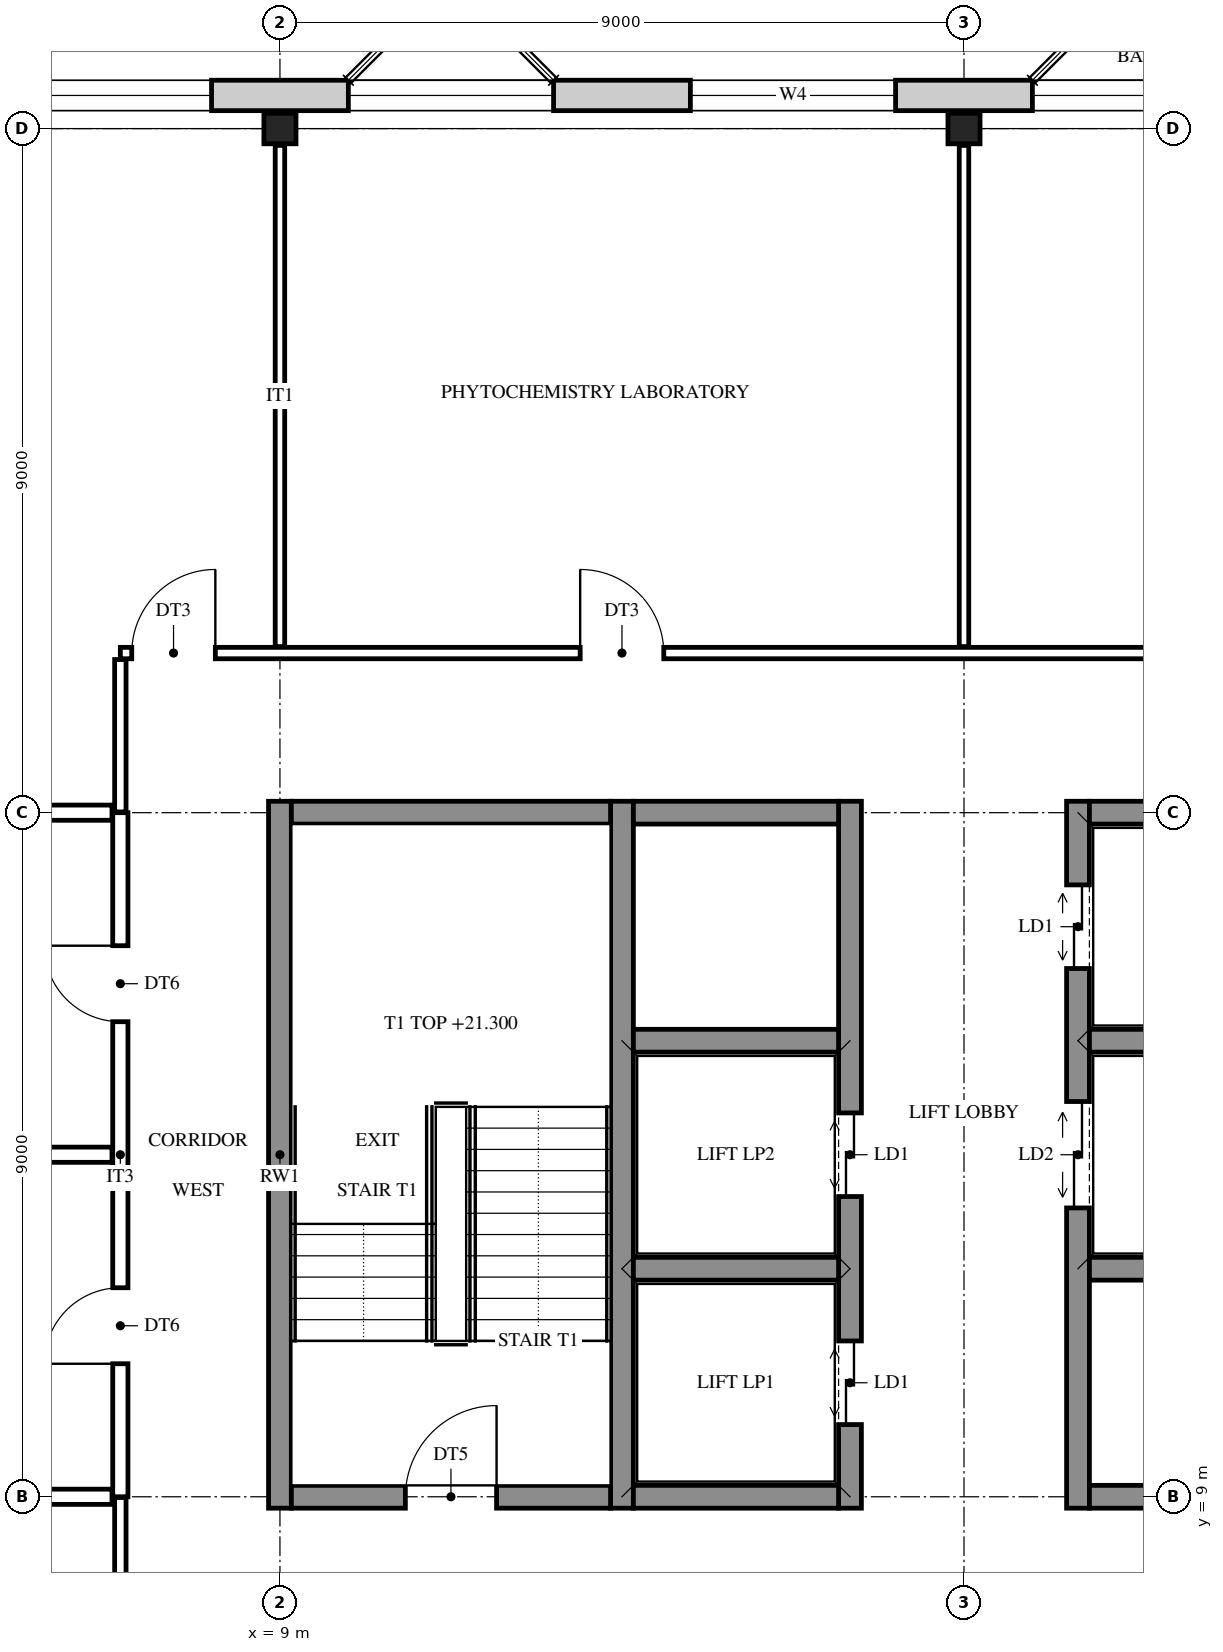
"""IFC4 building model, lengths in metres.
Left out: names, types, materials, properties, quantities, classifications, styles, units other than length and angle.
Written with IfcOpenShell. Run it as: python <this file> out.ifc"""

import sys

from ifc_helpers import new_model, si_unit, direction, frame, frame_2d, origin, origin_2d, place, context, subcontext, project, spatial, rectangle, i_section, extrude, element, fill, save


model = new_model("IFC4")
c1 = context("Model", 3, precision=1e-05, world=origin(), true_north=direction((0.0, 1.0)))
c2 = subcontext(c1, "Body", "Model", "MODEL_VIEW")
j1 = project(units=[si_unit("LENGTHUNIT", "METRE"), si_unit("PLANEANGLEUNIT", "RADIAN")], contexts=[c1])
p1 = place(None, origin())
s1 = spatial("IfcSite", under=j1, at=p1, CompositionType="ELEMENT")
p2 = place(p1, origin())
s2 = spatial("IfcBuilding", under=s1, at=p2, CompositionType="ELEMENT")
p3 = place(p2, frame((0.0, 0.0, 19.2)))
s3 = spatial("IfcBuildingStorey", under=s2, at=p3, CompositionType="ELEMENT", Elevation=19.2)
for number, where, z_axis, x_axis in (
    (1, (9.0, 27.0, 0.0), (0.0, 0.0, 1.0), (0.0, 1.0, 0.0)),
    (2, (18.0, 27.0, 0.0), (0.0, 0.0, 1.0), (0.0, 1.0, 0.0)),
):
    element("IfcColumn", number, at=place(p3, frame(where, z_axis=z_axis, x_axis=x_axis)), inside=s3, PredefinedType="COLUMN", context=c2, shape_type="SweptSolid", body=[
        extrude(i_section(OverallWidth=0.4, OverallDepth=0.422, WebThickness=0.028, FlangeThickness=0.036, at=origin_2d()), origin(), (0.0, 0.0, 1.0), 4.2),
    ])
for number, where, z_axis, x_axis in (
    (3, (9.0, 8.85, 0.0), (0.0, 0.0, 1.0), (0.0, 1.0, 0.0)),
    (4, (13.5, 8.85, 0.0), (0.0, 0.0, 1.0), (0.0, 1.0, 0.0)),
):
    element("IfcWall", number, at=place(p3, frame(where, z_axis=z_axis, x_axis=x_axis)), inside=s3, PredefinedType="SHEAR", context=c2, shape_type="SweptSolid", body=[
        extrude(rectangle(XDim=9.3, YDim=0.3, at=frame_2d((4.65, 0.0))), origin(), (0.0, 0.0, 1.0), 4.2),
    ])
p4 = place(p3, frame((16.5, 8.85, 0.0), z_axis=(0.0, 0.0, 1.0), x_axis=(0.0, 1.0, 0.0)))
e5 = element("IfcWall", 5, at=p4, inside=s3, PredefinedType="SHEAR", context=c2, shape_type="SweptSolid", body=[
    extrude(rectangle(XDim=9.3, YDim=0.3, at=frame_2d((4.65, 0.0))), origin(), (0.0, 0.0, 1.0), 4.2),
])
p5 = place(p4, frame((1.1, 0.0, 0.0)))
e6 = element("IfcOpeningElement", 6, at=p5, cuts=e5, PredefinedType="OPENING", context=c2, shape_type="SweptSolid", body=[
    extrude(rectangle(XDim=1.1, YDim=2.1, at=frame_2d((0.55, 1.05))), frame((0.0, 0.16, 0.0), z_axis=(0.0, -1.0, 0.0), x_axis=(1.0, 0.0, 0.0)), (0.0, 0.0, 1.0), 0.32),
])
p6 = place(p4, frame((4.1, 0.0, 0.0)))
e7 = element("IfcOpeningElement", 7, at=p6, cuts=e5, PredefinedType="OPENING", context=c2, shape_type="SweptSolid", body=[
    extrude(rectangle(XDim=1.1, YDim=2.1, at=frame_2d((0.55, 1.05))), frame((0.0, 0.16, 0.0), z_axis=(0.0, -1.0, 0.0), x_axis=(1.0, 0.0, 0.0)), (0.0, 0.0, 1.0), 0.32),
])
p7 = place(p3, frame((19.5, 8.85, 0.0), z_axis=(0.0, 0.0, 1.0), x_axis=(0.0, 1.0, 0.0)))
e8 = element("IfcWall", 8, at=p7, inside=s3, PredefinedType="SHEAR", context=c2, shape_type="SweptSolid", body=[
    extrude(rectangle(XDim=9.3, YDim=0.3, at=frame_2d((4.65, 0.0))), origin(), (0.0, 0.0, 1.0), 4.2),
])
p8 = place(p7, frame((3.95, 0.0, 0.0)))
e9 = element("IfcOpeningElement", 9, at=p8, cuts=e8, PredefinedType="OPENING", context=c2, shape_type="SweptSolid", body=[
    extrude(rectangle(XDim=1.4, YDim=2.1, at=frame_2d((0.7, 1.05))), frame((0.0, 0.16, 0.0), z_axis=(0.0, -1.0, 0.0), x_axis=(1.0, 0.0, 0.0)), (0.0, 0.0, 1.0), 0.32),
])
p9 = place(p7, frame((7.1, 0.0, 0.0)))
e10 = element("IfcOpeningElement", 10, at=p9, cuts=e8, PredefinedType="OPENING", context=c2, shape_type="SweptSolid", body=[
    extrude(rectangle(XDim=1.1, YDim=2.1, at=frame_2d((0.55, 1.05))), frame((0.0, 0.16, 0.0), z_axis=(0.0, -1.0, 0.0), x_axis=(1.0, 0.0, 0.0)), (0.0, 0.0, 1.0), 0.32),
])
p10 = place(p3, frame((9.15, 9.0, 0.0), z_axis=(0.0, 0.0, 1.0), x_axis=(1.0, 0.0, 0.0)))
e11 = element("IfcWall", 11, at=p10, inside=s3, PredefinedType="SHEAR", context=c2, shape_type="SweptSolid", body=[
    extrude(rectangle(XDim=4.2, YDim=0.3, at=frame_2d((2.1, 0.0))), origin(), (0.0, 0.0, 1.0), 4.2),
])
p11 = place(p10, frame((1.5, 0.0, 0.0)))
e12 = element("IfcOpeningElement", 12, at=p11, cuts=e11, PredefinedType="OPENING", context=c2, shape_type="SweptSolid", body=[
    extrude(rectangle(XDim=1.2, YDim=2.1, at=frame_2d((0.6, 1.05))), frame((0.0, 0.16, 0.0), z_axis=(0.0, -1.0, 0.0), x_axis=(1.0, 0.0, 0.0)), (0.0, 0.0, 1.0), 0.32),
])
for number, where, z_axis, x_axis in (
    (13, (13.65, 9.0, 0.0), (0.0, 0.0, 1.0), (1.0, 0.0, 0.0)),
    (14, (19.65, 9.0, 0.0), (0.0, 0.0, 1.0), (1.0, 0.0, 0.0)),
    (15, (13.65, 12.0, 0.0), (0.0, 0.0, 1.0), (1.0, 0.0, 0.0)),
    (16, (19.65, 12.0, 0.0), (0.0, 0.0, 1.0), (1.0, 0.0, 0.0)),
    (17, (13.65, 15.0, 0.0), (0.0, 0.0, 1.0), (1.0, 0.0, 0.0)),
    (18, (19.65, 15.0, 0.0), (0.0, 0.0, 1.0), (1.0, 0.0, 0.0)),
):
    element("IfcWall", number, at=place(p3, frame(where, z_axis=z_axis, x_axis=x_axis)), inside=s3, PredefinedType="SHEAR", context=c2, shape_type="SweptSolid", body=[
        extrude(rectangle(XDim=2.7, YDim=0.3, at=frame_2d((1.35, 0.0))), origin(), (0.0, 0.0, 1.0), 4.2),
    ])
p12 = place(p3, frame((9.15, 18.0, 0.0), z_axis=(0.0, 0.0, 1.0), x_axis=(1.0, 0.0, 0.0)))
e19 = element("IfcWall", 19, at=p12, inside=s3, PredefinedType="SHEAR", context=c2, shape_type="SweptSolid", body=[
    extrude(rectangle(XDim=4.2, YDim=0.3, at=frame_2d((2.1, 0.0))), origin(), (0.0, 0.0, 1.0), 4.2),
])
for number, where, z_axis, x_axis in (
    (20, (13.65, 18.0, 0.0), (0.0, 0.0, 1.0), (1.0, 0.0, 0.0)),
    (21, (19.65, 18.0, 0.0), (0.0, 0.0, 1.0), (1.0, 0.0, 0.0)),
):
    element("IfcWall", number, at=place(p3, frame(where, z_axis=z_axis, x_axis=x_axis)), inside=s3, PredefinedType="SHEAR", context=c2, shape_type="SweptSolid", body=[
        extrude(rectangle(XDim=2.7, YDim=0.3, at=frame_2d((1.35, 0.0))), origin(), (0.0, 0.0, 1.0), 4.2),
    ])
p13 = place(p3, frame((-0.625, 27.436, 0.0), z_axis=(0.0, 0.0, 1.0), x_axis=(1.0, 0.0, 0.0)))
e22 = element("IfcWall", 22, at=p13, inside=s3, PredefinedType="STANDARD", context=c2, shape_type="SweptSolid", body=[
    extrude(rectangle(XDim=32.75, YDim=0.4, at=frame_2d((16.375, 0.0))), origin(), (0.0, 0.0, 1.0), 4.2),
])
p14 = place(p13, frame((1.525, 0.0, 0.9)))
e23 = element("IfcOpeningElement", 23, at=p14, cuts=e22, PredefinedType="OPENING", context=c2, shape_type="SweptSolid", body=[
    extrude(rectangle(XDim=2.7, YDim=2.5, at=frame_2d((1.35, 1.25))), frame((0.0, 0.21, 0.0), z_axis=(0.0, -1.0, 0.0), x_axis=(1.0, 0.0, 0.0)), (0.0, 0.0, 1.0), 0.42),
])
p15 = place(p13, frame((6.025, 0.0, 0.9)))
e24 = element("IfcOpeningElement", 24, at=p15, cuts=e22, PredefinedType="OPENING", context=c2, shape_type="SweptSolid", body=[
    extrude(rectangle(XDim=2.7, YDim=2.5, at=frame_2d((1.35, 1.25))), frame((0.0, 0.21, 0.0), z_axis=(0.0, -1.0, 0.0), x_axis=(1.0, 0.0, 0.0)), (0.0, 0.0, 1.0), 0.42),
])
p16 = place(p13, frame((10.525, 0.0, 0.9)))
e25 = element("IfcOpeningElement", 25, at=p16, cuts=e22, PredefinedType="OPENING", context=c2, shape_type="SweptSolid", body=[
    extrude(rectangle(XDim=2.7, YDim=2.5, at=frame_2d((1.35, 1.25))), frame((0.0, 0.21, 0.0), z_axis=(0.0, -1.0, 0.0), x_axis=(1.0, 0.0, 0.0)), (0.0, 0.0, 1.0), 0.42),
])
p17 = place(p13, frame((15.025, 0.0, 0.9)))
e26 = element("IfcOpeningElement", 26, at=p17, cuts=e22, PredefinedType="OPENING", context=c2, shape_type="SweptSolid", body=[
    extrude(rectangle(XDim=2.7, YDim=2.5, at=frame_2d((1.35, 1.25))), frame((0.0, 0.21, 0.0), z_axis=(0.0, -1.0, 0.0), x_axis=(1.0, 0.0, 0.0)), (0.0, 0.0, 1.0), 0.42),
])
p18 = place(p13, frame((19.525, 0.0, 0.9)))
e27 = element("IfcOpeningElement", 27, at=p18, cuts=e22, PredefinedType="OPENING", context=c2, shape_type="SweptSolid", body=[
    extrude(rectangle(XDim=2.7, YDim=2.5, at=frame_2d((1.35, 1.25))), frame((0.0, 0.21, 0.0), z_axis=(0.0, -1.0, 0.0), x_axis=(1.0, 0.0, 0.0)), (0.0, 0.0, 1.0), 0.42),
])
p19 = place(p13, frame((24.025, 0.0, 0.9)))
e28 = element("IfcOpeningElement", 28, at=p19, cuts=e22, PredefinedType="OPENING", context=c2, shape_type="SweptSolid", body=[
    extrude(rectangle(XDim=2.7, YDim=2.5, at=frame_2d((1.35, 1.25))), frame((0.0, 0.21, 0.0), z_axis=(0.0, -1.0, 0.0), x_axis=(1.0, 0.0, 0.0)), (0.0, 0.0, 1.0), 0.42),
])
p20 = place(p13, frame((28.525, 0.0, 0.9)))
e29 = element("IfcOpeningElement", 29, at=p20, cuts=e22, PredefinedType="OPENING", context=c2, shape_type="SweptSolid", body=[
    extrude(rectangle(XDim=2.7, YDim=2.5, at=frame_2d((1.35, 1.25))), frame((0.0, 0.21, 0.0), z_axis=(0.0, -1.0, 0.0), x_axis=(1.0, 0.0, 0.0)), (0.0, 0.0, 1.0), 0.42),
])
p21 = place(p3, frame((6.9, 6.985, 0.0), z_axis=(0.0, 0.0, 1.0), x_axis=(0.0, 1.0, 0.0)))
e30 = element("IfcWall", 30, at=p21, inside=s3, PredefinedType="PARTITIONING", context=c2, shape_type="SweptSolid", body=[
    extrude(rectangle(XDim=2.005, YDim=0.15, at=frame_2d((1.002, 0.0))), origin(), (0.0, 0.0, 1.0), 3.537),
])
p22 = place(p3, frame((6.9, 9.0, 0.0), z_axis=(0.0, 0.0, 1.0), x_axis=(0.0, 1.0, 0.0)))
e31 = element("IfcWall", 31, at=p22, inside=s3, PredefinedType="PARTITIONING", context=c2, shape_type="SweptSolid", body=[
    extrude(rectangle(XDim=9.0, YDim=0.2, at=frame_2d((4.5, 0.0))), origin(), (0.0, 0.0, 1.0), 3.537),
])
p23 = place(p22, frame((1.75, 0.0, 0.0)))
e32 = element("IfcOpeningElement", 32, at=p23, cuts=e31, PredefinedType="OPENING", context=c2, shape_type="SweptSolid", body=[
    extrude(rectangle(XDim=1.0, YDim=2.1, at=frame_2d((0.5, 1.05))), frame((0.0, 0.11, 0.0), z_axis=(0.0, -1.0, 0.0), x_axis=(1.0, 0.0, 0.0)), (0.0, 0.0, 1.0), 0.22),
])
p24 = place(p22, frame((6.25, 0.0, 0.0)))
e33 = element("IfcOpeningElement", 33, at=p24, cuts=e31, PredefinedType="OPENING", context=c2, shape_type="SweptSolid", body=[
    extrude(rectangle(XDim=1.0, YDim=2.1, at=frame_2d((0.5, 1.05))), frame((0.0, 0.11, 0.0), z_axis=(0.0, -1.0, 0.0), x_axis=(1.0, 0.0, 0.0)), (0.0, 0.0, 1.0), 0.22),
])
p25 = place(p3, frame((6.9, 18.01, 0.0), z_axis=(0.0, 0.0, 1.0), x_axis=(0.0, 1.0, 0.0)))
e34 = element("IfcWall", 34, at=p25, inside=s3, PredefinedType="PARTITIONING", context=c2, shape_type="SweptSolid", body=[
    extrude(rectangle(XDim=2.005, YDim=0.15, at=frame_2d((1.002, 0.0))), origin(), (0.0, 0.0, 1.0), 3.537),
])
for number, where, z_axis, x_axis in (
    (35, (9.0, 20.185, 0.0), (0.0, 0.0, 1.0), (0.0, 1.0, 0.0)),
    (36, (18.0, 20.185, 0.0), (0.0, 0.0, 1.0), (0.0, 1.0, 0.0)),
):
    element("IfcWall", number, at=place(p3, frame(where, z_axis=z_axis, x_axis=x_axis)), inside=s3, PredefinedType="PARTITIONING", context=c2, shape_type="SweptSolid", body=[
        extrude(rectangle(XDim=6.594, YDim=0.125, at=frame_2d((3.297, 0.0))), origin(), (0.0, 0.0, 1.0), 3.537),
    ])
p26 = place(p3, frame((0.21, 9.0, 0.0), z_axis=(0.0, 0.0, 1.0), x_axis=(1.0, 0.0, 0.0)))
e37 = element("IfcWall", 37, at=p26, inside=s3, PredefinedType="PARTITIONING", context=c2, shape_type="SweptSolid", body=[
    extrude(rectangle(XDim=6.58, YDim=0.2, at=frame_2d((3.29, 0.0))), origin(), (0.0, 0.0, 1.0), 3.537),
])
p27 = place(p3, frame((-0.215, 13.5, 0.0), z_axis=(0.0, 0.0, 1.0), x_axis=(1.0, 0.0, 0.0)))
e38 = element("IfcWall", 38, at=p27, inside=s3, PredefinedType="PARTITIONING", context=c2, shape_type="SweptSolid", body=[
    extrude(rectangle(XDim=7.005, YDim=0.2, at=frame_2d((3.502, 0.0))), origin(), (0.0, 0.0, 1.0), 3.537),
])
p28 = place(p3, frame((0.21, 18.0, 0.0), z_axis=(0.0, 0.0, 1.0), x_axis=(1.0, 0.0, 0.0)))
e39 = element("IfcWall", 39, at=p28, inside=s3, PredefinedType="PARTITIONING", context=c2, shape_type="SweptSolid", body=[
    extrude(rectangle(XDim=6.58, YDim=0.2, at=frame_2d((3.29, 0.0))), origin(), (0.0, 0.0, 1.0), 3.537),
])
p29 = place(p3, frame((6.9, 20.1, 0.0), z_axis=(0.0, 0.0, 1.0), x_axis=(1.0, 0.0, 0.0)))
e40 = element("IfcWall", 40, at=p29, inside=s3, PredefinedType="PARTITIONING", context=c2, shape_type="SweptSolid", body=[
    extrude(rectangle(XDim=20.1, YDim=0.15, at=frame_2d((10.05, 0.0))), origin(), (0.0, 0.0, 1.0), 3.537),
])
p30 = place(p29, frame((0.15, 0.0, 0.0)))
e41 = element("IfcOpeningElement", 41, at=p30, cuts=e40, PredefinedType="OPENING", context=c2, shape_type="SweptSolid", body=[
    extrude(rectangle(XDim=1.1, YDim=2.1, at=frame_2d((0.55, 1.05))), frame((0.0, 0.085, 0.0), z_axis=(0.0, -1.0, 0.0), x_axis=(1.0, 0.0, 0.0)), (0.0, 0.0, 1.0), 0.17),
])
p31 = place(p29, frame((6.05, 0.0, 0.0)))
e42 = element("IfcOpeningElement", 42, at=p31, cuts=e40, PredefinedType="OPENING", context=c2, shape_type="SweptSolid", body=[
    extrude(rectangle(XDim=1.1, YDim=2.1, at=frame_2d((0.55, 1.05))), frame((0.0, 0.085, 0.0), z_axis=(0.0, -1.0, 0.0), x_axis=(1.0, 0.0, 0.0)), (0.0, 0.0, 1.0), 0.17),
])
p32 = place(p29, frame((16.25, 0.0, 0.0)))
e43 = element("IfcOpeningElement", 43, at=p32, cuts=e40, PredefinedType="OPENING", context=c2, shape_type="SweptSolid", body=[
    extrude(rectangle(XDim=1.1, YDim=2.1, at=frame_2d((0.55, 1.05))), frame((0.0, 0.085, 0.0), z_axis=(0.0, -1.0, 0.0), x_axis=(1.0, 0.0, 0.0)), (0.0, 0.0, 1.0), 0.17),
])
p33 = place(p15, origin())
e44 = element("IfcWindow", 44, at=p33, inside=s3, PartitioningType="SINGLE_PANEL", PredefinedType="WINDOW", context=c2, shape_type="SweptSolid", body=[
    extrude(rectangle(XDim=2.7, YDim=2.5, at=frame_2d((1.35, 1.25))), frame((0.0, 0.03, 0.0), z_axis=(0.0, -1.0, 0.0), x_axis=(1.0, 0.0, 0.0)), (0.0, 0.0, 1.0), 0.06),
])
fill(e24, e44)
p34 = place(p16, origin())
e45 = element("IfcWindow", 45, at=p34, inside=s3, PartitioningType="SINGLE_PANEL", PredefinedType="WINDOW", context=c2, shape_type="SweptSolid", body=[
    extrude(rectangle(XDim=2.7, YDim=2.5, at=frame_2d((1.35, 1.25))), frame((0.0, 0.03, 0.0), z_axis=(0.0, -1.0, 0.0), x_axis=(1.0, 0.0, 0.0)), (0.0, 0.0, 1.0), 0.06),
])
fill(e25, e45)
p35 = place(p17, origin())
e46 = element("IfcWindow", 46, at=p35, inside=s3, PartitioningType="SINGLE_PANEL", PredefinedType="WINDOW", context=c2, shape_type="SweptSolid", body=[
    extrude(rectangle(XDim=2.7, YDim=2.5, at=frame_2d((1.35, 1.25))), frame((0.0, 0.03, 0.0), z_axis=(0.0, -1.0, 0.0), x_axis=(1.0, 0.0, 0.0)), (0.0, 0.0, 1.0), 0.06),
])
fill(e26, e46)
p36 = place(p18, origin())
e47 = element("IfcWindow", 47, at=p36, inside=s3, PartitioningType="SINGLE_PANEL", PredefinedType="WINDOW", context=c2, shape_type="SweptSolid", body=[
    extrude(rectangle(XDim=2.7, YDim=2.5, at=frame_2d((1.35, 1.25))), frame((0.0, 0.03, 0.0), z_axis=(0.0, -1.0, 0.0), x_axis=(1.0, 0.0, 0.0)), (0.0, 0.0, 1.0), 0.06),
])
fill(e27, e47)
p37 = place(p11, origin())
e48 = element("IfcDoor", 48, at=p37, inside=s3, OperationType="SINGLE_SWING_RIGHT", PredefinedType="DOOR", context=c2, shape_type="SweptSolid", body=[
    extrude(rectangle(XDim=1.2, YDim=2.1, at=frame_2d((0.6, 1.05))), frame((0.0, 0.025, 0.0), z_axis=(0.0, -1.0, 0.0), x_axis=(1.0, 0.0, 0.0)), (0.0, 0.0, 1.0), 0.05),
])
fill(e12, e48)
p38 = place(p30, origin())
e49 = element("IfcDoor", 49, at=p38, inside=s3, OperationType="SINGLE_SWING_RIGHT", PredefinedType="DOOR", context=c2, shape_type="SweptSolid", body=[
    extrude(rectangle(XDim=1.1, YDim=2.1, at=frame_2d((0.55, 1.05))), frame((0.0, 0.025, 0.0), z_axis=(0.0, -1.0, 0.0), x_axis=(1.0, 0.0, 0.0)), (0.0, 0.0, 1.0), 0.05),
])
fill(e41, e49)
p39 = place(p31, origin())
e50 = element("IfcDoor", 50, at=p39, inside=s3, OperationType="SINGLE_SWING_LEFT", PredefinedType="DOOR", context=c2, shape_type="SweptSolid", body=[
    extrude(rectangle(XDim=1.1, YDim=2.1, at=frame_2d((0.55, 1.05))), frame((0.0, 0.025, 0.0), z_axis=(0.0, -1.0, 0.0), x_axis=(1.0, 0.0, 0.0)), (0.0, 0.0, 1.0), 0.05),
])
fill(e42, e50)
p40 = place(p23, origin())
e51 = element("IfcDoor", 51, at=p40, inside=s3, OperationType="SINGLE_SWING_LEFT", PredefinedType="DOOR", context=c2, shape_type="SweptSolid", body=[
    extrude(rectangle(XDim=1.0, YDim=2.1, at=frame_2d((0.5, 1.05))), frame((0.0, 0.025, 0.0), z_axis=(0.0, -1.0, 0.0), x_axis=(1.0, 0.0, 0.0)), (0.0, 0.0, 1.0), 0.05),
])
fill(e32, e51)
p41 = place(p24, origin())
e52 = element("IfcDoor", 52, at=p41, inside=s3, OperationType="SINGLE_SWING_RIGHT", PredefinedType="DOOR", context=c2, shape_type="SweptSolid", body=[
    extrude(rectangle(XDim=1.0, YDim=2.1, at=frame_2d((0.5, 1.05))), frame((0.0, 0.025, 0.0), z_axis=(0.0, -1.0, 0.0), x_axis=(1.0, 0.0, 0.0)), (0.0, 0.0, 1.0), 0.05),
])
fill(e33, e52)
p42 = place(p5, origin())
e53 = element("IfcDoor", 53, at=p42, inside=s3, OperationType="DOUBLE_DOOR_SLIDING", PredefinedType="DOOR", context=c2, shape_type="SweptSolid", body=[
    extrude(rectangle(XDim=1.1, YDim=2.1, at=frame_2d((0.55, 1.05))), frame((0.0, 0.025, 0.0), z_axis=(0.0, -1.0, 0.0), x_axis=(1.0, 0.0, 0.0)), (0.0, 0.0, 1.0), 0.05),
])
fill(e6, e53)
p43 = place(p6, origin())
e54 = element("IfcDoor", 54, at=p43, inside=s3, OperationType="DOUBLE_DOOR_SLIDING", PredefinedType="DOOR", context=c2, shape_type="SweptSolid", body=[
    extrude(rectangle(XDim=1.1, YDim=2.1, at=frame_2d((0.55, 1.05))), frame((0.0, 0.025, 0.0), z_axis=(0.0, -1.0, 0.0), x_axis=(1.0, 0.0, 0.0)), (0.0, 0.0, 1.0), 0.05),
])
fill(e7, e54)
p44 = place(p8, origin())
e55 = element("IfcDoor", 55, at=p44, inside=s3, OperationType="DOUBLE_DOOR_SLIDING", PredefinedType="DOOR", context=c2, shape_type="SweptSolid", body=[
    extrude(rectangle(XDim=1.4, YDim=2.1, at=frame_2d((0.7, 1.05))), frame((0.0, 0.025, 0.0), z_axis=(0.0, -1.0, 0.0), x_axis=(1.0, 0.0, 0.0)), (0.0, 0.0, 1.0), 0.05),
])
fill(e9, e55)
p45 = place(p9, origin())
e56 = element("IfcDoor", 56, at=p45, inside=s3, OperationType="DOUBLE_DOOR_SLIDING", PredefinedType="DOOR", context=c2, shape_type="SweptSolid", body=[
    extrude(rectangle(XDim=1.1, YDim=2.1, at=frame_2d((0.55, 1.05))), frame((0.0, 0.025, 0.0), z_axis=(0.0, -1.0, 0.0), x_axis=(1.0, 0.0, 0.0)), (0.0, 0.0, 1.0), 0.05),
])
fill(e10, e56)
save(model, sys.argv[1])
